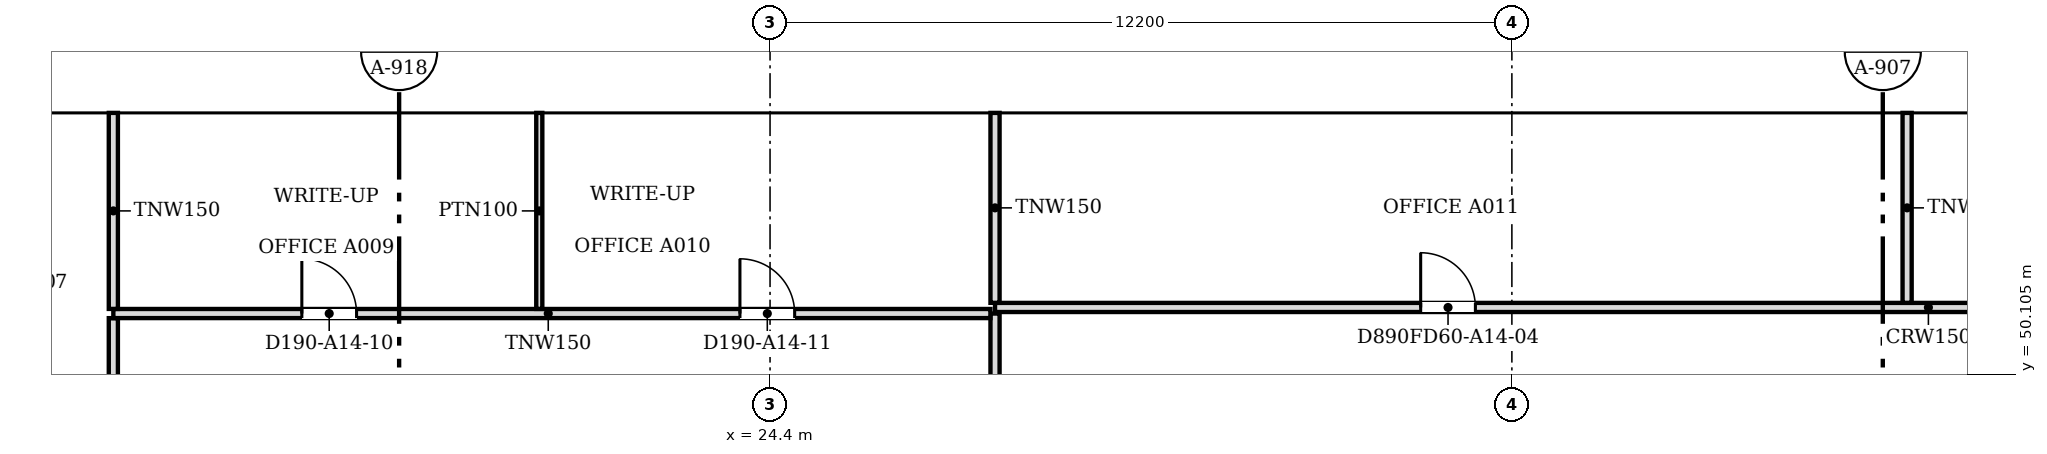
"""IFC4 building model, lengths in metres.
Left out: names, types, materials, properties, quantities, classifications, styles, units other than length and angle.
Written with IfcOpenShell. Run it as: python <this file> out.ifc"""

import sys

from ifc_helpers import new_model, si_unit, direction, frame, frame_2d, origin, place, context, subcontext, project, spatial, polyline, rectangle, outline, extrude, faceted_brep, source, transform, mapped, element, fill, save


model = new_model("IFC4")
c1 = context("Model", 3, precision=1e-05, world=origin(), true_north=direction((0.0, 1.0)))
c2 = subcontext(c1, "Body", "Model", "MODEL_VIEW")
j1 = project(units=[si_unit("LENGTHUNIT", "METRE"), si_unit("PLANEANGLEUNIT", "RADIAN")], contexts=[c1])
p1 = place(None, origin())
s1 = spatial("IfcSite", under=j1, at=p1, CompositionType="ELEMENT")
p2 = place(p1, origin())
s2 = spatial("IfcBuilding", under=s1, at=p2, CompositionType="ELEMENT")
p3 = place(p2, frame((0.0, 0.0, 155.4)))
s3 = spatial("IfcBuildingStorey", under=s2, at=p3, CompositionType="ELEMENT", Elevation=155.4)
m1 = source(origin(), c2, "Body", "SweptSolid", [
    extrude(outline(polyline([(6.1, 0.0), (3.05, 3.8), (0.0, 0.0), (6.1, 0.0)])), frame((0.0, 0.25, 0.0), z_axis=(0.0, -1.0, 0.0), x_axis=(1.0, 0.0, 0.0)), (0.0, 0.0, 1.0), 0.5),
])
p4 = place(p3, frame((45.75, 54.65, 0.0), z_axis=(0.0, 0.0, 1.0), x_axis=(-1.0, 0.0, 0.0)))
e1 = element("IfcWall", 1, at=p4, inside=s3, PredefinedType="SOLIDWALL", context=c2, shape_type="MappedRepresentation", body=[
    mapped(m1, transform((0.0, 0.0, 0.0), scale=1.0)),
])
m2 = source(origin(), c2, "Body", "SweptSolid", [
    extrude(outline(polyline([(5.579, 0.25), (3.05, 3.401), (0.521, 0.25), (5.579, 0.25)])), frame((0.0, 0.26, 0.0), z_axis=(0.0, -1.0, 0.0), x_axis=(1.0, 0.0, 0.0)), (0.0, 0.0, 1.0), 0.52),
])
p5 = place(p4, origin())
e2 = element("IfcOpeningElement", 2, at=p5, cuts=e1, PredefinedType="OPENING", context=c2, shape_type="MappedRepresentation", body=[
    mapped(m2, transform((0.0, 0.0, 0.0), scale=1.0)),
])
m3 = source(origin(), c2, "Body", "Brep", [
    faceted_brep([(6.1, -0.25, 0.0), (3.05, -0.25, 3.8), (0.0, -0.25, 0.0), (6.1, -0.25, 0.0), (0.0, 0.25, 0.0), (3.05, 0.25, 3.8), (6.1, 0.25, 0.0), (6.1, 0.25, 0.0)], [[[0, 1, 2, 3]], [[4, 5, 6, 7]], [[6, 5, 1, 0]], [[5, 4, 2, 1]], [[4, 7, 3, 2]], [[3, 7, 6, 0]]]),
])
p6 = place(p3, frame((39.65, 54.65, 0.0), z_axis=(0.0, 0.0, 1.0), x_axis=(-1.0, 0.0, 0.0)))
e3 = element("IfcWall", 3, at=p6, inside=s3, PredefinedType="SOLIDWALL", context=c2, shape_type="MappedRepresentation", body=[
    mapped(m3, transform((0.0, 0.0, 0.0), scale=1.0)),
])
p7 = place(p6, origin())
e4 = element("IfcOpeningElement", 4, at=p7, cuts=e3, PredefinedType="OPENING", context=c2, shape_type="MappedRepresentation", body=[
    mapped(m2, transform((0.0, 0.0, 0.0), scale=1.0)),
])
p8 = place(p3, frame((33.55, 54.65, 0.0), z_axis=(0.0, 0.0, 1.0), x_axis=(-1.0, 0.0, 0.0)))
e5 = element("IfcWall", 5, at=p8, inside=s3, PredefinedType="SOLIDWALL", context=c2, shape_type="MappedRepresentation", body=[
    mapped(m1, transform((0.0, 0.0, 0.0), scale=1.0)),
])
p9 = place(p8, origin())
e6 = element("IfcOpeningElement", 6, at=p9, cuts=e5, PredefinedType="OPENING", context=c2, shape_type="MappedRepresentation", body=[
    mapped(m2, transform((0.0, 0.0, 0.0), scale=1.0)),
])
p10 = place(p3, frame((27.45, 54.65, 0.0), z_axis=(0.0, 0.0, 1.0), x_axis=(-1.0, 0.0, 0.0)))
e7 = element("IfcWall", 7, at=p10, inside=s3, PredefinedType="SOLIDWALL", context=c2, shape_type="MappedRepresentation", body=[
    mapped(m3, transform((0.0, 0.0, 0.0), scale=1.0)),
])
p11 = place(p10, origin())
e8 = element("IfcOpeningElement", 8, at=p11, cuts=e7, PredefinedType="OPENING", context=c2, shape_type="MappedRepresentation", body=[
    mapped(m2, transform((0.0, 0.0, 0.0), scale=1.0)),
])
p12 = place(p3, frame((21.35, 54.65, 0.0), z_axis=(0.0, 0.0, 1.0), x_axis=(-1.0, 0.0, 0.0)))
e9 = element("IfcWall", 9, at=p12, inside=s3, PredefinedType="SOLIDWALL", context=c2, shape_type="MappedRepresentation", body=[
    mapped(m1, transform((0.0, 0.0, 0.0), scale=1.0)),
])
p13 = place(p12, origin())
e10 = element("IfcOpeningElement", 10, at=p13, cuts=e9, PredefinedType="OPENING", context=c2, shape_type="MappedRepresentation", body=[
    mapped(m2, transform((0.0, 0.0, 0.0), scale=1.0)),
])
p14 = place(p3, frame((15.25, 54.65, 0.0), z_axis=(0.0, 0.0, 1.0), x_axis=(-1.0, 0.0, 0.0)))
e11 = element("IfcWall", 11, at=p14, inside=s3, PredefinedType="SOLIDWALL", context=c2, shape_type="MappedRepresentation", body=[
    mapped(m1, transform((0.0, 0.0, 0.0), scale=1.0)),
])
p15 = place(p14, origin())
e12 = element("IfcOpeningElement", 12, at=p15, cuts=e11, PredefinedType="OPENING", context=c2, shape_type="MappedRepresentation", body=[
    mapped(m2, transform((0.0, 0.0, 0.0), scale=1.0)),
])
p16 = place(p2, frame((0.0, 0.0, 159.2)))
s4 = spatial("IfcBuildingStorey", under=s2, at=p16, CompositionType="ELEMENT", Elevation=159.2)
m4 = source(origin(), c2, "Body", "SweptSolid", [
    extrude(outline(polyline([(3.05, 0.0), (6.1, 3.8), (3.05, 7.6), (0.0, 3.8), (3.05, 0.0)])), frame((0.0, 0.25, 0.0), z_axis=(0.0, -1.0, 0.0), x_axis=(1.0, 0.0, 0.0)), (0.0, 0.0, 1.0), 0.5),
])
p17 = place(p16, frame((48.8, 54.65, -3.8), z_axis=(0.0, 0.0, 1.0), x_axis=(-1.0, 0.0, 0.0)))
e13 = element("IfcWall", 13, at=p17, inside=s4, PredefinedType="SOLIDWALL", context=c2, shape_type="MappedRepresentation", body=[
    mapped(m4, transform((0.0, 0.0, 0.0), scale=1.0)),
])
m5 = source(origin(), c2, "Body", "SweptSolid", [
    extrude(outline(polyline([(3.05, 0.399), (5.78, 3.8), (3.05, 7.201), (0.321, 3.8), (3.05, 0.399)])), frame((0.0, 0.26, 0.0), z_axis=(0.0, -1.0, 0.0), x_axis=(1.0, 0.0, 0.0)), (0.0, 0.0, 1.0), 0.52),
])
p18 = place(p17, origin())
e14 = element("IfcOpeningElement", 14, at=p18, cuts=e13, PredefinedType="OPENING", context=c2, shape_type="MappedRepresentation", body=[
    mapped(m5, transform((0.0, 0.0, 0.0), scale=1.0)),
])
m6 = source(origin(), c2, "Body", "Brep", [
    faceted_brep([(3.05, -0.25, 0.0), (6.1, -0.25, 3.8), (6.1, -0.25, 3.8), (3.05, -0.25, 7.6), (0.0, -0.25, 3.8), (0.0, 0.25, 3.8), (3.05, 0.25, 7.6), (6.1, 0.25, 3.8), (6.1, 0.25, 3.8), (3.05, 0.25, 0.0)], [[[0, 1, 2, 3, 4]], [[5, 6, 7, 8, 9]], [[9, 8, 1, 0]], [[7, 6, 3, 2]], [[6, 5, 4, 3]], [[5, 9, 0, 4]], [[1, 8, 7, 2]]]),
])
p19 = place(p16, frame((42.7, 54.65, -3.8), z_axis=(0.0, 0.0, 1.0), x_axis=(-1.0, 0.0, 0.0)))
e15 = element("IfcWall", 15, at=p19, inside=s4, PredefinedType="SOLIDWALL", context=c2, shape_type="MappedRepresentation", body=[
    mapped(m6, transform((0.0, 0.0, 0.0), scale=1.0)),
])
p20 = place(p19, origin())
e16 = element("IfcOpeningElement", 16, at=p20, cuts=e15, PredefinedType="OPENING", context=c2, shape_type="MappedRepresentation", body=[
    mapped(m5, transform((0.0, 0.0, 0.0), scale=1.0)),
])
p21 = place(p16, frame((36.6, 54.65, -3.8), z_axis=(0.0, 0.0, 1.0), x_axis=(-1.0, 0.0, 0.0)))
e17 = element("IfcWall", 17, at=p21, inside=s4, PredefinedType="SOLIDWALL", context=c2, shape_type="MappedRepresentation", body=[
    mapped(m4, transform((0.0, 0.0, 0.0), scale=1.0)),
])
p22 = place(p21, origin())
e18 = element("IfcOpeningElement", 18, at=p22, cuts=e17, PredefinedType="OPENING", context=c2, shape_type="MappedRepresentation", body=[
    mapped(m5, transform((0.0, 0.0, 0.0), scale=1.0)),
])
p23 = place(p16, frame((30.5, 54.65, -3.8), z_axis=(0.0, 0.0, 1.0), x_axis=(-1.0, 0.0, 0.0)))
e19 = element("IfcWall", 19, at=p23, inside=s4, PredefinedType="SOLIDWALL", context=c2, shape_type="MappedRepresentation", body=[
    mapped(m4, transform((0.0, 0.0, 0.0), scale=1.0)),
])
p24 = place(p23, origin())
e20 = element("IfcOpeningElement", 20, at=p24, cuts=e19, PredefinedType="OPENING", context=c2, shape_type="MappedRepresentation", body=[
    mapped(m5, transform((0.0, 0.0, 0.0), scale=1.0)),
])
p25 = place(p16, frame((24.4, 54.65, -3.8), z_axis=(0.0, 0.0, 1.0), x_axis=(-1.0, 0.0, 0.0)))
e21 = element("IfcWall", 21, at=p25, inside=s4, PredefinedType="SOLIDWALL", context=c2, shape_type="MappedRepresentation", body=[
    mapped(m6, transform((0.0, 0.0, 0.0), scale=1.0)),
])
p26 = place(p25, origin())
e22 = element("IfcOpeningElement", 22, at=p26, cuts=e21, PredefinedType="OPENING", context=c2, shape_type="MappedRepresentation", body=[
    mapped(m5, transform((0.0, 0.0, 0.0), scale=1.0)),
])
p27 = place(p16, frame((18.3, 54.65, -3.8), z_axis=(0.0, 0.0, 1.0), x_axis=(-1.0, 0.0, 0.0)))
e23 = element("IfcWall", 23, at=p27, inside=s4, PredefinedType="SOLIDWALL", context=c2, shape_type="MappedRepresentation", body=[
    mapped(m4, transform((0.0, 0.0, 0.0), scale=1.0)),
])
p28 = place(p27, origin())
e24 = element("IfcOpeningElement", 24, at=p28, cuts=e23, PredefinedType="OPENING", context=c2, shape_type="MappedRepresentation", body=[
    mapped(m5, transform((0.0, 0.0, 0.0), scale=1.0)),
])
p29 = place(p3, frame((13.6, 47.776, 0.0), z_axis=(0.0, 0.0, 1.0), x_axis=(0.0, 1.0, 0.0)))
e25 = element("IfcWall", 25, at=p29, inside=s3, PredefinedType="PARTITIONING", context=c2, shape_type="SweptSolid", body=[
    extrude(rectangle(XDim=3.248, YDim=0.15, at=frame_2d((1.624, 0.0))), origin(), (0.0, 0.0, 1.0), 3.067),
])
p30 = place(p3, frame((28.1, 47.776, 0.0), z_axis=(0.0, 0.0, 1.0), x_axis=(0.0, 1.0, 0.0)))
e26 = element("IfcWall", 26, at=p30, inside=s3, PredefinedType="PARTITIONING", context=c2, shape_type="SweptSolid", body=[
    extrude(rectangle(XDim=3.324, YDim=0.15, at=frame_2d((1.662, 0.0))), origin(), (0.0, 0.0, 1.0), 3.067),
])
p31 = place(p3, frame((13.6, 51.1, 0.0), z_axis=(0.0, 0.0, 1.0), x_axis=(1.0, 0.0, 0.0)))
e27 = element("IfcWall", 27, at=p31, inside=s3, PredefinedType="PARTITIONING", context=c2, shape_type="SweptSolid", body=[
    extrude(rectangle(XDim=14.424, YDim=0.15, at=frame_2d((7.212, 0.0))), origin(), (0.0, 0.0, 1.0), 3.067),
])
m7 = source(origin(), c2, "Body", "SweptSolid", [
    extrude(rectangle(XDim=0.9, YDim=2.1, at=frame_2d((0.45, 1.05))), frame((0.0, 0.085, 0.0), z_axis=(0.0, -1.0, 0.0), x_axis=(1.0, 0.0, 0.0)), (0.0, 0.0, 1.0), 0.17),
])
p32 = place(p31, frame((3.1, 0.0, 0.0)))
e28 = element("IfcOpeningElement", 28, at=p32, cuts=e27, PredefinedType="OPENING", context=c2, shape_type="MappedRepresentation", body=[
    mapped(m7, transform((0.0, 0.0, 0.0), scale=1.0)),
])
p33 = place(p31, frame((10.305, 0.0, 0.0)))
e29 = element("IfcOpeningElement", 29, at=p33, cuts=e27, PredefinedType="OPENING", context=c2, shape_type="MappedRepresentation", body=[
    mapped(m7, transform((0.0, 0.0, 0.0), scale=1.0)),
])
p34 = place(p3, frame((13.6, 51.176, 0.0), z_axis=(0.0, 0.0, 1.0), x_axis=(0.0, 1.0, 0.0)))
e30 = element("IfcWall", 30, at=p34, inside=s3, PredefinedType="PARTITIONING", context=c2, shape_type="SweptSolid", body=[
    extrude(rectangle(XDim=3.224, YDim=0.15, at=frame_2d((1.612, 0.0))), origin(), (0.0, 0.0, 1.0), 3.067),
])
p35 = place(p3, frame((20.605, 51.176, 0.0), z_axis=(0.0, 0.0, 1.0), x_axis=(0.0, 1.0, 0.0)))
e31 = element("IfcWall", 31, at=p35, inside=s3, PredefinedType="PARTITIONING", context=c2, shape_type="SweptSolid", body=[
    extrude(rectangle(XDim=3.224, YDim=0.1, at=frame_2d((1.612, 0.0))), origin(), (0.0, 0.0, 1.0), 3.067),
])
p36 = place(p3, frame((28.1, 51.2, 0.0), z_axis=(0.0, 0.0, 1.0), x_axis=(1.0, 0.0, 0.0)))
e32 = element("IfcWall", 32, at=p36, inside=s3, PredefinedType="PARTITIONING", context=c2, shape_type="SweptSolid", body=[
    extrude(rectangle(XDim=31.438, YDim=0.15, at=frame_2d((15.719, 0.0))), origin(), (0.0, 0.0, 1.0), 3.067),
])
p37 = place(p36, frame((7.0, 0.0, 0.0)))
e33 = element("IfcOpeningElement", 33, at=p37, cuts=e32, PredefinedType="OPENING", context=c2, shape_type="MappedRepresentation", body=[
    mapped(m7, transform((0.0, 0.0, 0.0), scale=1.0)),
])
p38 = place(p36, frame((22.8, 0.0, 0.0)))
e34 = element("IfcOpeningElement", 34, at=p38, cuts=e32, PredefinedType="OPENING", context=c2, shape_type="MappedRepresentation", body=[
    mapped(m7, transform((0.0, 0.0, 0.0), scale=1.0)),
])
for number, where, z_axis, x_axis in (
    (35, (28.1, 51.276, 0.0), (0.0, 0.0, 1.0), (0.0, 1.0, 0.0)),
    (36, (43.1, 51.276, 0.0), (0.0, 0.0, 1.0), (0.0, 1.0, 0.0)),
):
    element("IfcWall", number, at=place(p3, frame(where, z_axis=z_axis, x_axis=x_axis)), inside=s3, PredefinedType="PARTITIONING", context=c2, shape_type="SweptSolid", body=[
        extrude(rectangle(XDim=3.124, YDim=0.15, at=frame_2d((1.562, 0.0))), origin(), (0.0, 0.0, 1.0), 3.067),
    ])
m8 = source(origin(), c2, "Body", "SweptSolid", [
    extrude(rectangle(XDim=0.9, YDim=2.1, at=frame_2d((0.45, 1.05))), frame((0.0, 0.025, 0.0), z_axis=(0.0, -1.0, 0.0), x_axis=(1.0, 0.0, 0.0)), (0.0, 0.0, 1.0), 0.05),
])
p39 = place(p32, origin())
e37 = element("IfcDoor", 37, at=p39, inside=s3, OperationType="SINGLE_SWING_LEFT", PredefinedType="DOOR", context=c2, shape_type="MappedRepresentation", body=[
    mapped(m8, transform((0.0, 0.0, 0.0), scale=1.0)),
])
fill(e28, e37)
p40 = place(p33, origin())
e38 = element("IfcDoor", 38, at=p40, inside=s3, OperationType="SINGLE_SWING_LEFT", PredefinedType="DOOR", context=c2, shape_type="MappedRepresentation", body=[
    mapped(m8, transform((0.0, 0.0, 0.0), scale=1.0)),
])
fill(e29, e38)
p41 = place(p37, origin())
e39 = element("IfcDoor", 39, at=p41, inside=s3, OperationType="SINGLE_SWING_LEFT", PredefinedType="DOOR", context=c2, shape_type="MappedRepresentation", body=[
    mapped(m8, transform((0.0, 0.0, 0.0), scale=1.0)),
])
fill(e33, e39)
save(model, sys.argv[1])
